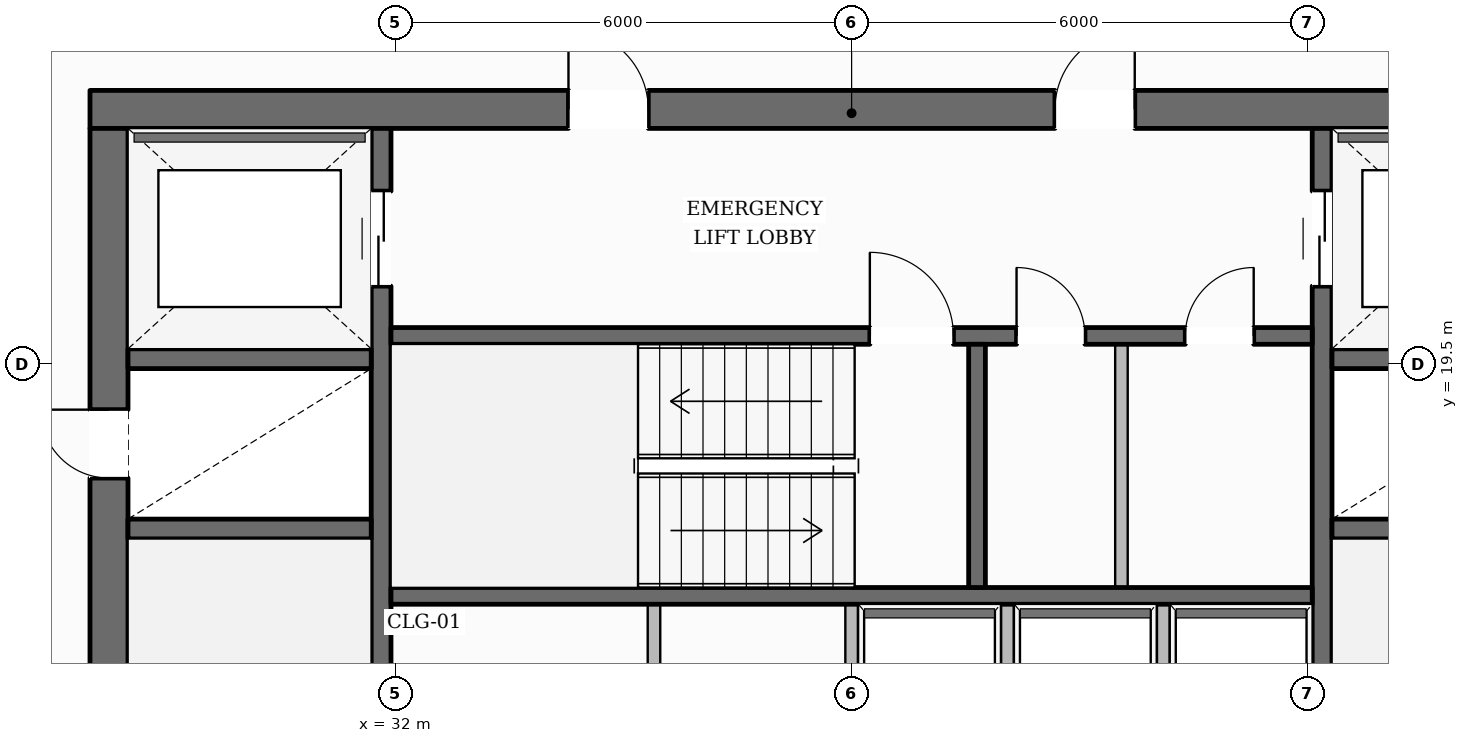
"""IFC4 building model, lengths in metres.
Left out: names, types, materials, properties, quantities, classifications, styles, units other than length and angle.
Written with IfcOpenShell. Run it as: python <this file> out.ifc"""

import sys

from ifc_helpers import new_model, si_unit, direction, frame, frame_2d, origin, place, context, subcontext, project, spatial, rectangle, extrude, element, fill, save


model = new_model("IFC4")
c1 = context("Model", 3, precision=1e-05, world=origin(), true_north=direction((0.0, 1.0)))
c2 = subcontext(c1, "Body", "Model", "MODEL_VIEW")
j1 = project(units=[si_unit("LENGTHUNIT", "METRE"), si_unit("PLANEANGLEUNIT", "RADIAN")], contexts=[c1])
p1 = place(None, origin())
s1 = spatial("IfcSite", under=j1, at=p1, CompositionType="ELEMENT")
p2 = place(p1, origin())
s2 = spatial("IfcBuilding", under=s1, at=p2, CompositionType="ELEMENT")
p3 = place(p2, frame((0.0, 0.0, 100.9)))
s3 = spatial("IfcBuildingStorey", under=s2, at=p3, CompositionType="ELEMENT", Elevation=100.9)
p4 = place(p3, frame((27.98, 22.85, 0.0), z_axis=(0.0, 0.0, 1.0), x_axis=(1.0, 0.0, 0.0)))
e1 = element("IfcWall", 1, at=p4, inside=s3, PredefinedType="SOLIDWALL", context=c2, shape_type="SweptSolid", body=[
    extrude(rectangle(XDim=20.04, YDim=0.5, at=frame_2d((10.02, 0.0))), origin(), (0.0, 0.0, 1.0), 3.6),
])
p5 = place(p4, frame((6.295, 0.0, 0.0)))
e2 = element("IfcOpeningElement", 2, at=p5, cuts=e1, PredefinedType="OPENING", context=c2, shape_type="SweptSolid", body=[
    extrude(rectangle(XDim=1.05, YDim=2.15, at=frame_2d((0.525, 1.075))), frame((0.0, 0.26, 0.0), z_axis=(0.0, -1.0, 0.0), x_axis=(1.0, 0.0, 0.0)), (0.0, 0.0, 1.0), 0.52),
])
p6 = place(p4, frame((12.695, 0.0, 0.0)))
e3 = element("IfcOpeningElement", 3, at=p6, cuts=e1, PredefinedType="OPENING", context=c2, shape_type="SweptSolid", body=[
    extrude(rectangle(XDim=1.05, YDim=2.15, at=frame_2d((0.525, 1.075))), frame((0.0, 0.26, 0.0), z_axis=(0.0, -1.0, 0.0), x_axis=(1.0, 0.0, 0.0)), (0.0, 0.0, 1.0), 0.52),
])
p7 = place(p3, frame((28.23, 9.6, 0.0), z_axis=(0.0, 0.0, 1.0), x_axis=(0.0, 1.0, 0.0)))
e4 = element("IfcWall", 4, at=p7, inside=s3, PredefinedType="SOLIDWALL", context=c2, shape_type="SweptSolid", body=[
    extrude(rectangle(XDim=13.0, YDim=0.5, at=frame_2d((6.5, 0.0))), origin(), (0.0, 0.0, 1.0), 3.6),
])
p8 = place(p7, frame((0.2, 0.0, 0.0)))
e5 = element("IfcOpeningElement", 5, at=p8, cuts=e4, PredefinedType="OPENING", context=c2, shape_type="SweptSolid", body=[
    extrude(rectangle(XDim=1.1, YDim=2.15, at=frame_2d((0.55, 1.075))), frame((0.0, 0.26, 0.0), z_axis=(0.0, -1.0, 0.0), x_axis=(1.0, 0.0, 0.0)), (0.0, 0.0, 1.0), 0.52),
])
p9 = place(p7, frame((8.4, 0.0, 0.0)))
e6 = element("IfcOpeningElement", 6, at=p9, cuts=e4, PredefinedType="OPENING", context=c2, shape_type="SweptSolid", body=[
    extrude(rectangle(XDim=0.9, YDim=2.1, at=frame_2d((0.45, 1.05))), frame((0.0, 0.26, 0.0), z_axis=(0.0, -1.0, 0.0), x_axis=(1.0, 0.0, 0.0)), (0.0, 0.0, 1.0), 0.52),
])
p10 = place(p3, frame((31.81, 9.6, 0.0), z_axis=(0.0, 0.0, 1.0), x_axis=(0.0, 1.0, 0.0)))
e7 = element("IfcWall", 7, at=p10, inside=s3, PredefinedType="SHEAR", context=c2, shape_type="SweptSolid", body=[
    extrude(rectangle(XDim=13.0, YDim=0.26, at=frame_2d((6.5, 0.0))), origin(), (0.0, 0.0, 1.0), 3.6),
])
p11 = place(p10, frame((10.925, 0.0, 0.0)))
e8 = element("IfcOpeningElement", 8, at=p11, cuts=e7, PredefinedType="OPENING", context=c2, shape_type="SweptSolid", body=[
    extrude(rectangle(XDim=1.25, YDim=2.25, at=frame_2d((0.625, 1.125))), frame((0.0, 0.14, 0.0), z_axis=(0.0, -1.0, 0.0), x_axis=(1.0, 0.0, 0.0)), (0.0, 0.0, 1.0), 0.28),
])
p12 = place(p3, frame((44.19, 9.6, 0.0), z_axis=(0.0, 0.0, 1.0), x_axis=(0.0, 1.0, 0.0)))
e9 = element("IfcWall", 9, at=p12, inside=s3, PredefinedType="SHEAR", context=c2, shape_type="SweptSolid", body=[
    extrude(rectangle(XDim=13.0, YDim=0.26, at=frame_2d((6.5, 0.0))), origin(), (0.0, 0.0, 1.0), 3.6),
])
p13 = place(p12, frame((10.925, 0.0, 0.0)))
e10 = element("IfcOpeningElement", 10, at=p13, cuts=e9, PredefinedType="OPENING", context=c2, shape_type="SweptSolid", body=[
    extrude(rectangle(XDim=1.25, YDim=2.25, at=frame_2d((0.625, 1.125))), frame((0.0, 0.14, 0.0), z_axis=(0.0, -1.0, 0.0), x_axis=(1.0, 0.0, 0.0)), (0.0, 0.0, 1.0), 0.28),
])
for number, where, z_axis, x_axis in (
    (11, (28.48, 17.33, 0.0), (0.0, 0.0, 1.0), (1.0, 0.0, 0.0)),
    (12, (28.48, 19.57, 0.0), (0.0, 0.0, 1.0), (1.0, 0.0, 0.0)),
    (13, (44.32, 17.33, 0.0), (0.0, 0.0, 1.0), (1.0, 0.0, 0.0)),
    (14, (44.32, 19.57, 0.0), (0.0, 0.0, 1.0), (1.0, 0.0, 0.0)),
):
    element("IfcWall", number, at=place(p3, frame(where, z_axis=z_axis, x_axis=x_axis)), inside=s3, PredefinedType="SHEAR", context=c2, shape_type="SweptSolid", body=[
        extrude(rectangle(XDim=3.2, YDim=0.26, at=frame_2d((1.6, 0.0))), origin(), (0.0, 0.0, 1.0), 3.6),
    ])
p14 = place(p3, frame((31.94, 19.87, 0.0), z_axis=(0.0, 0.0, 1.0), x_axis=(1.0, 0.0, 0.0)))
e15 = element("IfcWall", 15, at=p14, inside=s3, PredefinedType="SOLIDWALL", context=c2, shape_type="SweptSolid", body=[
    extrude(rectangle(XDim=12.12, YDim=0.22, at=frame_2d((6.06, 0.0))), origin(), (0.0, 0.0, 1.0), 3.6),
])
p15 = place(p14, frame((6.3, 0.0, 0.0)))
e16 = element("IfcOpeningElement", 16, at=p15, cuts=e15, PredefinedType="OPENING", context=c2, shape_type="SweptSolid", body=[
    extrude(rectangle(XDim=1.1, YDim=2.15, at=frame_2d((0.55, 1.075))), frame((0.0, 0.12, 0.0), z_axis=(0.0, -1.0, 0.0), x_axis=(1.0, 0.0, 0.0)), (0.0, 0.0, 1.0), 0.24),
])
p16 = place(p14, frame((8.23, 0.0, 0.0)))
e17 = element("IfcOpeningElement", 17, at=p16, cuts=e15, PredefinedType="OPENING", context=c2, shape_type="SweptSolid", body=[
    extrude(rectangle(XDim=0.9, YDim=2.1, at=frame_2d((0.45, 1.05))), frame((0.0, 0.12, 0.0), z_axis=(0.0, -1.0, 0.0), x_axis=(1.0, 0.0, 0.0)), (0.0, 0.0, 1.0), 0.24),
])
p17 = place(p14, frame((10.45, 0.0, 0.0)))
e18 = element("IfcOpeningElement", 18, at=p17, cuts=e15, PredefinedType="OPENING", context=c2, shape_type="SweptSolid", body=[
    extrude(rectangle(XDim=0.9, YDim=2.1, at=frame_2d((0.45, 1.05))), frame((0.0, 0.12, 0.0), z_axis=(0.0, -1.0, 0.0), x_axis=(1.0, 0.0, 0.0)), (0.0, 0.0, 1.0), 0.24),
])
p18 = place(p3, frame((31.94, 16.45, 0.0), z_axis=(0.0, 0.0, 1.0), x_axis=(1.0, 0.0, 0.0)))
e19 = element("IfcWall", 19, at=p18, inside=s3, PredefinedType="SOLIDWALL", context=c2, shape_type="SweptSolid", body=[
    extrude(rectangle(XDim=12.12, YDim=0.22, at=frame_2d((6.06, 0.0))), origin(), (0.0, 0.0, 1.0), 3.6),
])
p19 = place(p3, frame((39.65, 16.56, 0.0), z_axis=(0.0, 0.0, 1.0), x_axis=(0.0, 1.0, 0.0)))
e20 = element("IfcWall", 20, at=p19, inside=s3, PredefinedType="SOLIDWALL", context=c2, shape_type="SweptSolid", body=[
    extrude(rectangle(XDim=3.2, YDim=0.22, at=frame_2d((1.6, 0.0))), origin(), (0.0, 0.0, 1.0), 3.6),
])
p20 = place(p3, frame((14.155, 13.347, 0.0), z_axis=(0.0, 0.0, 1.0), x_axis=(0.493868426836, 0.869536644986, 0.0)))
e21 = element("IfcWall", 21, at=p20, inside=s3, PredefinedType="STANDARD", context=c2, shape_type="SweptSolid", body=[
    extrude(rectangle(XDim=36.121, YDim=0.38, at=frame_2d((18.061, 0.0))), origin(), (0.0, 0.0, 1.0), 3.059),
])
p21 = place(p20, frame((31.935, 0.0, 0.65)))
e22 = element("IfcOpeningElement", 22, at=p21, cuts=e21, PredefinedType="OPENING", context=c2, shape_type="SweptSolid", body=[
    extrude(rectangle(XDim=1.55, YDim=1.75, at=frame_2d((0.775, 0.875))), frame((0.0, 0.2, 0.0), z_axis=(0.0, -1.0, 0.0), x_axis=(1.0, 0.0, 0.0)), (0.0, 0.0, 1.0), 0.4),
])
p22 = place(p20, frame((26.073, 0.0, 0.65)))
e23 = element("IfcOpeningElement", 23, at=p22, cuts=e21, PredefinedType="OPENING", context=c2, shape_type="SweptSolid", body=[
    extrude(rectangle(XDim=1.55, YDim=1.75, at=frame_2d((0.775, 0.875))), frame((0.0, 0.2, 0.0), z_axis=(0.0, -1.0, 0.0), x_axis=(1.0, 0.0, 0.0)), (0.0, 0.0, 1.0), 0.4),
])
p23 = place(p20, frame((14.352, 0.0, 0.65)))
e24 = element("IfcOpeningElement", 24, at=p23, cuts=e21, PredefinedType="OPENING", context=c2, shape_type="SweptSolid", body=[
    extrude(rectangle(XDim=1.55, YDim=1.75, at=frame_2d((0.775, 0.875))), frame((0.0, 0.2, 0.0), z_axis=(0.0, -1.0, 0.0), x_axis=(1.0, 0.0, 0.0)), (0.0, 0.0, 1.0), 0.4),
])
p24 = place(p20, frame((8.491, 0.0, 0.65)))
e25 = element("IfcOpeningElement", 25, at=p24, cuts=e21, PredefinedType="OPENING", context=c2, shape_type="SweptSolid", body=[
    extrude(rectangle(XDim=1.55, YDim=1.75, at=frame_2d((0.775, 0.875))), frame((0.0, 0.2, 0.0), z_axis=(0.0, -1.0, 0.0), x_axis=(1.0, 0.0, 0.0)), (0.0, 0.0, 1.0), 0.4),
])
p25 = place(p20, frame((2.63, 0.0, 0.65)))
e26 = element("IfcOpeningElement", 26, at=p25, cuts=e21, PredefinedType="OPENING", context=c2, shape_type="SweptSolid", body=[
    extrude(rectangle(XDim=1.55, YDim=1.75, at=frame_2d((0.775, 0.875))), frame((0.0, 0.2, 0.0), z_axis=(0.0, -1.0, 0.0), x_axis=(1.0, 0.0, 0.0)), (0.0, 0.0, 1.0), 0.4),
])
p26 = place(p3, frame((44.12, 44.689, 0.0), z_axis=(0.0, 0.0, 1.0), x_axis=(0.498376840975, -0.866960509124, 0.0)))
e27 = element("IfcWall", 27, at=p26, inside=s3, PredefinedType="STANDARD", context=c2, shape_type="SweptSolid", body=[
    extrude(rectangle(XDim=36.441, YDim=0.38, at=frame_2d((18.22, 0.0))), origin(), (0.0, 0.0, 1.0), 3.059),
])
p27 = place(p26, frame((32.234, 0.0, 0.65)))
e28 = element("IfcOpeningElement", 28, at=p27, cuts=e27, PredefinedType="OPENING", context=c2, shape_type="SweptSolid", body=[
    extrude(rectangle(XDim=1.55, YDim=1.75, at=frame_2d((0.775, 0.875))), frame((0.0, 0.2, 0.0), z_axis=(0.0, -1.0, 0.0), x_axis=(1.0, 0.0, 0.0)), (0.0, 0.0, 1.0), 0.4),
])
p28 = place(p26, frame((26.319, 0.0, 0.65)))
e29 = element("IfcOpeningElement", 29, at=p28, cuts=e27, PredefinedType="OPENING", context=c2, shape_type="SweptSolid", body=[
    extrude(rectangle(XDim=1.55, YDim=1.75, at=frame_2d((0.775, 0.875))), frame((0.0, 0.2, 0.0), z_axis=(0.0, -1.0, 0.0), x_axis=(1.0, 0.0, 0.0)), (0.0, 0.0, 1.0), 0.4),
])
p29 = place(p26, frame((14.489, 0.0, 0.65)))
e30 = element("IfcOpeningElement", 30, at=p29, cuts=e27, PredefinedType="OPENING", context=c2, shape_type="SweptSolid", body=[
    extrude(rectangle(XDim=1.55, YDim=1.75, at=frame_2d((0.775, 0.875))), frame((0.0, 0.2, 0.0), z_axis=(0.0, -1.0, 0.0), x_axis=(1.0, 0.0, 0.0)), (0.0, 0.0, 1.0), 0.4),
])
p30 = place(p26, frame((8.573, 0.0, 0.65)))
e31 = element("IfcOpeningElement", 31, at=p30, cuts=e27, PredefinedType="OPENING", context=c2, shape_type="SweptSolid", body=[
    extrude(rectangle(XDim=1.55, YDim=1.75, at=frame_2d((0.775, 0.875))), frame((0.0, 0.2, 0.0), z_axis=(0.0, -1.0, 0.0), x_axis=(1.0, 0.0, 0.0)), (0.0, 0.0, 1.0), 0.4),
])
p31 = place(p26, frame((2.658, 0.0, 0.65)))
e32 = element("IfcOpeningElement", 32, at=p31, cuts=e27, PredefinedType="OPENING", context=c2, shape_type="SweptSolid", body=[
    extrude(rectangle(XDim=1.55, YDim=1.75, at=frame_2d((0.775, 0.875))), frame((0.0, 0.2, 0.0), z_axis=(0.0, -1.0, 0.0), x_axis=(1.0, 0.0, 0.0)), (0.0, 0.0, 1.0), 0.4),
])
for number, where, z_axis, x_axis in (
    (33, (38.0, 14.1, 0.0), (0.0, 0.0, 1.0), (0.0, 1.0, 0.0)),
    (34, (35.4, 14.1, 0.0), (0.0, 0.0, 1.0), (0.0, 1.0, 0.0)),
    (35, (40.05, 14.1, 0.0), (0.0, 0.0, 1.0), (0.0, 1.0, 0.0)),
    (36, (42.1, 14.1, 0.0), (0.0, 0.0, 1.0), (0.0, 1.0, 0.0)),
):
    element("IfcWall", number, at=place(p3, frame(where, z_axis=z_axis, x_axis=x_axis)), inside=s3, PredefinedType="PARTITIONING", context=c2, shape_type="SweptSolid", body=[
        extrude(rectangle(XDim=2.24, YDim=0.165, at=frame_2d((1.12, 0.0))), origin(), (0.0, 0.0, 1.0), 3.6),
    ])
p32 = place(p3, frame((41.55, 16.56, 0.0), z_axis=(0.0, 0.0, 1.0), x_axis=(0.0, 1.0, 0.0)))
e37 = element("IfcWall", 37, at=p32, inside=s3, PredefinedType="PARTITIONING", context=c2, shape_type="SweptSolid", body=[
    extrude(rectangle(XDim=3.2, YDim=0.165, at=frame_2d((1.6, 0.0))), origin(), (0.0, 0.0, 1.0), 3.6),
])
p33 = place(p15, origin())
e38 = element("IfcDoor", 38, at=p33, inside=s3, OperationType="SINGLE_SWING_LEFT", PredefinedType="DOOR", context=c2, shape_type="SweptSolid", body=[
    extrude(rectangle(XDim=1.1, YDim=2.15, at=frame_2d((0.55, 1.075))), frame((0.0, 0.025, 0.0), z_axis=(0.0, -1.0, 0.0), x_axis=(1.0, 0.0, 0.0)), (0.0, 0.0, 1.0), 0.05),
])
fill(e16, e38)
p34 = place(p9, origin())
e39 = element("IfcDoor", 39, at=p34, inside=s3, OperationType="SINGLE_SWING_RIGHT", PredefinedType="DOOR", context=c2, shape_type="SweptSolid", body=[
    extrude(rectangle(XDim=0.9, YDim=2.1, at=frame_2d((0.45, 1.05))), frame((0.0, 0.025, 0.0), z_axis=(0.0, -1.0, 0.0), x_axis=(1.0, 0.0, 0.0)), (0.0, 0.0, 1.0), 0.05),
])
fill(e6, e39)
p35 = place(p5, origin())
e40 = element("IfcDoor", 40, at=p35, inside=s3, OperationType="SINGLE_SWING_LEFT", PredefinedType="DOOR", context=c2, shape_type="SweptSolid", body=[
    extrude(rectangle(XDim=1.05, YDim=2.15, at=frame_2d((0.525, 1.075))), frame((0.0, 0.025, 0.0), z_axis=(0.0, -1.0, 0.0), x_axis=(1.0, 0.0, 0.0)), (0.0, 0.0, 1.0), 0.05),
])
fill(e2, e40)
p36 = place(p6, origin())
e41 = element("IfcDoor", 41, at=p36, inside=s3, OperationType="SINGLE_SWING_RIGHT", PredefinedType="DOOR", context=c2, shape_type="SweptSolid", body=[
    extrude(rectangle(XDim=1.05, YDim=2.15, at=frame_2d((0.525, 1.075))), frame((0.0, 0.025, 0.0), z_axis=(0.0, -1.0, 0.0), x_axis=(1.0, 0.0, 0.0)), (0.0, 0.0, 1.0), 0.05),
])
fill(e3, e41)
p37 = place(p11, origin())
e42 = element("IfcDoor", 42, at=p37, inside=s3, OperationType="DOUBLE_DOOR_SLIDING", PredefinedType="DOOR", context=c2, shape_type="SweptSolid", body=[
    extrude(rectangle(XDim=1.25, YDim=2.25, at=frame_2d((0.625, 1.125))), frame((0.0, 0.025, 0.0), z_axis=(0.0, -1.0, 0.0), x_axis=(1.0, 0.0, 0.0)), (0.0, 0.0, 1.0), 0.05),
])
fill(e8, e42)
p38 = place(p13, origin())
e43 = element("IfcDoor", 43, at=p38, inside=s3, OperationType="DOUBLE_DOOR_SLIDING", PredefinedType="DOOR", context=c2, shape_type="SweptSolid", body=[
    extrude(rectangle(XDim=1.25, YDim=2.25, at=frame_2d((0.625, 1.125))), frame((0.0, 0.025, 0.0), z_axis=(0.0, -1.0, 0.0), x_axis=(1.0, 0.0, 0.0)), (0.0, 0.0, 1.0), 0.05),
])
fill(e10, e43)
p39 = place(p16, origin())
e44 = element("IfcDoor", 44, at=p39, inside=s3, OperationType="SINGLE_SWING_LEFT", PredefinedType="DOOR", context=c2, shape_type="SweptSolid", body=[
    extrude(rectangle(XDim=0.9, YDim=2.1, at=frame_2d((0.45, 1.05))), frame((0.0, 0.025, 0.0), z_axis=(0.0, -1.0, 0.0), x_axis=(1.0, 0.0, 0.0)), (0.0, 0.0, 1.0), 0.05),
])
fill(e17, e44)
p40 = place(p17, origin())
e45 = element("IfcDoor", 45, at=p40, inside=s3, OperationType="SINGLE_SWING_RIGHT", PredefinedType="DOOR", context=c2, shape_type="SweptSolid", body=[
    extrude(rectangle(XDim=0.9, YDim=2.1, at=frame_2d((0.45, 1.05))), frame((0.0, 0.025, 0.0), z_axis=(0.0, -1.0, 0.0), x_axis=(1.0, 0.0, 0.0)), (0.0, 0.0, 1.0), 0.05),
])
fill(e18, e45)
save(model, sys.argv[1])
